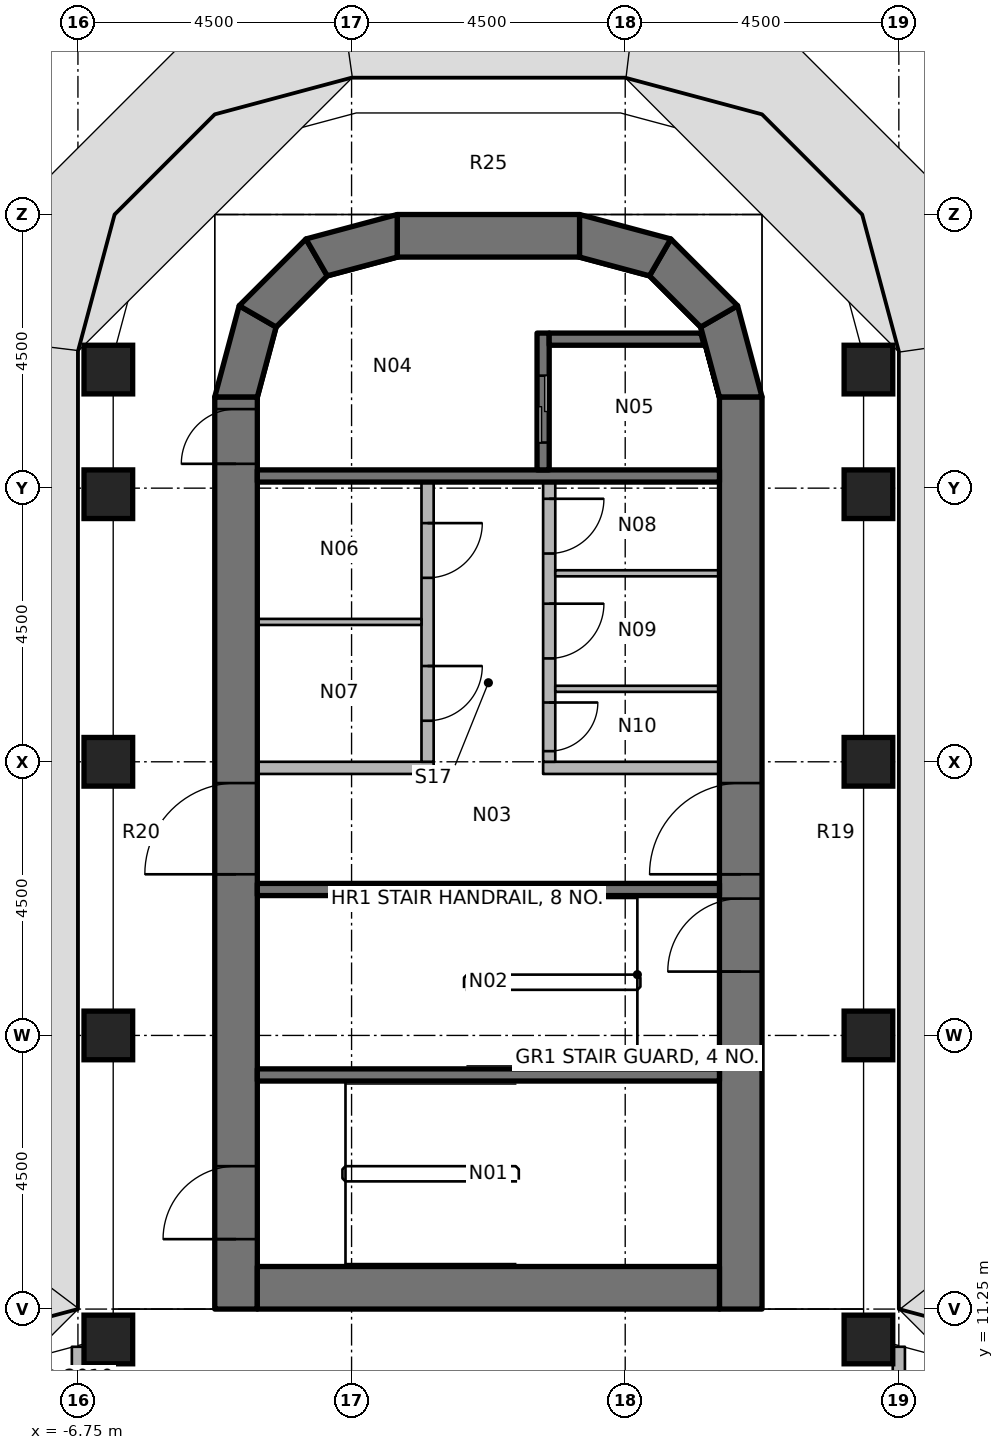
"""IFC4 building model, lengths in metres.
Left out: names, types, materials, properties, quantities, classifications, styles, units other than length and angle.
Written with IfcOpenShell. Run it as: python <this file> out.ifc"""

import sys

from ifc_helpers import new_model, si_unit, direction, frame, frame_2d, origin, origin_2d, place, context, subcontext, project, spatial, polyline, rectangle, outline, extrude, element, fill, save


model = new_model("IFC4")
c1 = context("Model", 3, precision=1e-05, world=origin(), true_north=direction((0.0, 1.0)))
c2 = subcontext(c1, "Body", "Model", "MODEL_VIEW")
j1 = project(units=[si_unit("LENGTHUNIT", "METRE"), si_unit("PLANEANGLEUNIT", "RADIAN")], contexts=[c1])
p1 = place(None, origin())
s1 = spatial("IfcSite", under=j1, at=p1, CompositionType="ELEMENT")
p2 = place(p1, origin())
s2 = spatial("IfcBuilding", under=s1, at=p2, CompositionType="ELEMENT")
p3 = place(p2, frame((0.0, 0.0, 186.6)))
s3 = spatial("IfcBuildingStorey", under=s2, at=p3, CompositionType="ELEMENT", Elevation=186.6)
for number, where, z_axis, x_axis in (
    (1, (-6.25, 10.75, 0.0), (0.0, 0.0, 1.0), (1.0, 0.0, 0.0)),
    (2, (-6.25, 15.75, 0.0), (0.0, 0.0, 1.0), (1.0, 0.0, 0.0)),
    (3, (-6.25, 20.25, 0.0), (0.0, 0.0, 1.0), (1.0, 0.0, 0.0)),
    (4, (-6.25, 24.65, 0.0), (0.0, 0.0, 1.0), (1.0, 0.0, 0.0)),
    (5, (-6.25, 26.7, 0.0), (0.0, 0.0, 1.0), (1.0, 0.0, 0.0)),
    (6, (6.25, 10.75, 0.0), (0.0, 0.0, 1.0), (1.0, 0.0, 0.0)),
    (7, (6.25, 15.75, 0.0), (0.0, 0.0, 1.0), (1.0, 0.0, 0.0)),
    (8, (6.25, 20.25, 0.0), (0.0, 0.0, 1.0), (1.0, 0.0, 0.0)),
    (9, (6.25, 24.65, 0.0), (0.0, 0.0, 1.0), (1.0, 0.0, 0.0)),
    (10, (6.25, 26.7, 0.0), (0.0, 0.0, 1.0), (1.0, 0.0, 0.0)),
):
    element("IfcColumn", number, at=place(p3, frame(where, z_axis=z_axis, x_axis=x_axis)), inside=s3, PredefinedType="COLUMN", context=c2, shape_type="SweptSolid", body=[
        extrude(rectangle(XDim=0.8, YDim=0.8, at=origin_2d()), origin(), (0.0, 0.0, 1.0), 3.65),
    ])
p4 = place(p3, frame((-4.15, 11.25, 0.0), z_axis=(0.0, 0.0, 1.0), x_axis=(0.0, 1.0, 0.0)))
e11 = element("IfcWall", 11, at=p4, inside=s3, PredefinedType="SHEAR", context=c2, shape_type="SweptSolid", body=[
    extrude(rectangle(XDim=15.0, YDim=0.7, at=frame_2d((7.5, 0.0))), origin(), (0.0, 0.0, 1.0), 3.8),
])
p5 = place(p4, frame((7.15, 0.0, 0.0)))
e12 = element("IfcOpeningElement", 12, at=p5, cuts=e11, PredefinedType="OPENING", context=c2, shape_type="SweptSolid", body=[
    extrude(rectangle(XDim=1.5, YDim=2.3, at=frame_2d((0.75, 1.15))), frame((0.0, 0.36, 0.0), z_axis=(0.0, -1.0, 0.0), x_axis=(1.0, 0.0, 0.0)), (0.0, 0.0, 1.0), 0.72),
])
p6 = place(p4, frame((13.9, 0.0, 0.0)))
e13 = element("IfcOpeningElement", 13, at=p6, cuts=e11, PredefinedType="OPENING", context=c2, shape_type="SweptSolid", body=[
    extrude(rectangle(XDim=0.9, YDim=2.1, at=frame_2d((0.45, 1.05))), frame((0.0, 0.36, 0.0), z_axis=(0.0, -1.0, 0.0), x_axis=(1.0, 0.0, 0.0)), (0.0, 0.0, 1.0), 0.72),
])
p7 = place(p4, frame((1.15, 0.0, 0.0)))
e14 = element("IfcOpeningElement", 14, at=p7, cuts=e11, PredefinedType="OPENING", context=c2, shape_type="SweptSolid", body=[
    extrude(rectangle(XDim=1.2, YDim=2.1, at=frame_2d((0.6, 1.05))), frame((0.0, 0.36, 0.0), z_axis=(0.0, -1.0, 0.0), x_axis=(1.0, 0.0, 0.0)), (0.0, 0.0, 1.0), 0.72),
])
p8 = place(p3, frame((4.15, 11.25, 0.0), z_axis=(0.0, 0.0, 1.0), x_axis=(0.0, 1.0, 0.0)))
e15 = element("IfcWall", 15, at=p8, inside=s3, PredefinedType="SHEAR", context=c2, shape_type="SweptSolid", body=[
    extrude(rectangle(XDim=15.0, YDim=0.7, at=frame_2d((7.5, 0.0))), origin(), (0.0, 0.0, 1.0), 3.8),
])
p9 = place(p8, frame((7.15, 0.0, 0.0)))
e16 = element("IfcOpeningElement", 16, at=p9, cuts=e15, PredefinedType="OPENING", context=c2, shape_type="SweptSolid", body=[
    extrude(rectangle(XDim=1.5, YDim=2.3, at=frame_2d((0.75, 1.15))), frame((0.0, 0.36, 0.0), z_axis=(0.0, -1.0, 0.0), x_axis=(1.0, 0.0, 0.0)), (0.0, 0.0, 1.0), 0.72),
])
p10 = place(p8, frame((5.55, 0.0, 0.0)))
e17 = element("IfcOpeningElement", 17, at=p10, cuts=e15, PredefinedType="OPENING", context=c2, shape_type="SweptSolid", body=[
    extrude(rectangle(XDim=1.2, YDim=2.1, at=frame_2d((0.6, 1.05))), frame((0.0, 0.36, 0.0), z_axis=(0.0, -1.0, 0.0), x_axis=(1.0, 0.0, 0.0)), (0.0, 0.0, 1.0), 0.72),
])
p11 = place(p3, frame((-3.8, 11.6, 0.0), z_axis=(0.0, 0.0, 1.0), x_axis=(1.0, 0.0, 0.0)))
e18 = element("IfcWall", 18, at=p11, inside=s3, PredefinedType="SHEAR", context=c2, shape_type="SweptSolid", body=[
    extrude(rectangle(XDim=7.6, YDim=0.7, at=frame_2d((3.8, 0.0))), origin(), (0.0, 0.0, 1.0), 3.8),
])
p12 = place(p3, frame((-1.5, 28.9, 0.0), z_axis=(0.0, 0.0, 1.0), x_axis=(1.0, 0.0, 0.0)))
e19 = element("IfcWall", 19, at=p12, inside=s3, PredefinedType="SHEAR", context=c2, shape_type="SweptSolid", body=[
    extrude(rectangle(XDim=3.0, YDim=0.7, at=frame_2d((1.5, 0.0))), origin(), (0.0, 0.0, 1.0), 3.8),
])
p13 = place(p3, origin())
e20 = element("IfcWall", 20, at=p13, inside=s3, PredefinedType="SHEAR", context=c2, shape_type="SweptSolid", body=[
    extrude(outline(polyline([(-4.5, 26.25), (-4.098, 27.75), (-3.492, 27.4), (-3.8, 26.25), (-4.5, 26.25)])), origin(), (0.0, 0.0, 1.0), 3.8),
])
p14 = place(p3, origin())
e21 = element("IfcWall", 21, at=p14, inside=s3, PredefinedType="SHEAR", context=c2, shape_type="SweptSolid", body=[
    extrude(outline(polyline([(-4.098, 27.75), (-3.0, 28.848), (-2.65, 28.242), (-3.492, 27.4), (-4.098, 27.75)])), origin(), (0.0, 0.0, 1.0), 3.8),
])
p15 = place(p3, origin())
e22 = element("IfcWall", 22, at=p15, inside=s3, PredefinedType="SHEAR", context=c2, shape_type="SweptSolid", body=[
    extrude(outline(polyline([(-3.0, 28.848), (-1.5, 29.25), (-1.5, 28.55), (-2.65, 28.242), (-3.0, 28.848)])), origin(), (0.0, 0.0, 1.0), 3.8),
])
p16 = place(p3, origin())
e23 = element("IfcWall", 23, at=p16, inside=s3, PredefinedType="SHEAR", context=c2, shape_type="SweptSolid", body=[
    extrude(outline(polyline([(4.5, 26.25), (4.098, 27.75), (3.492, 27.4), (3.8, 26.25), (4.5, 26.25)])), origin(), (0.0, 0.0, 1.0), 3.8),
])
p17 = place(p3, origin())
e24 = element("IfcWall", 24, at=p17, inside=s3, PredefinedType="SHEAR", context=c2, shape_type="SweptSolid", body=[
    extrude(outline(polyline([(4.098, 27.75), (3.0, 28.848), (2.65, 28.242), (3.492, 27.4), (4.098, 27.75)])), origin(), (0.0, 0.0, 1.0), 3.8),
])
p18 = place(p3, origin())
e25 = element("IfcWall", 25, at=p18, inside=s3, PredefinedType="SHEAR", context=c2, shape_type="SweptSolid", body=[
    extrude(outline(polyline([(3.0, 28.848), (1.5, 29.25), (1.5, 28.55), (2.65, 28.242), (3.0, 28.848)])), origin(), (0.0, 0.0, 1.0), 3.8),
])
p19 = place(p3, frame((-3.8, 24.95, 0.0), z_axis=(0.0, 0.0, 1.0), x_axis=(1.0, 0.0, 0.0)))
e26 = element("IfcWall", 26, at=p19, inside=s3, PredefinedType="SHEAR", context=c2, shape_type="SweptSolid", body=[
    extrude(rectangle(XDim=7.6, YDim=0.2, at=frame_2d((3.8, 0.0))), origin(), (0.0, 0.0, 1.0), 3.65),
])
p20 = place(p3, frame((0.9, 27.3, 0.0), z_axis=(0.0, 0.0, 1.0), x_axis=(0.0, -1.0, 0.0)))
e27 = element("IfcWall", 27, at=p20, inside=s3, PredefinedType="SHEAR", context=c2, shape_type="SweptSolid", body=[
    extrude(rectangle(XDim=2.25, YDim=0.2, at=frame_2d((1.125, 0.0))), origin(), (0.0, 0.0, 1.0), 3.65),
])
p21 = place(p20, frame((0.7, 0.0, 0.0)))
e28 = element("IfcOpeningElement", 28, at=p21, cuts=e27, PredefinedType="OPENING", context=c2, shape_type="SweptSolid", body=[
    extrude(rectangle(XDim=1.1, YDim=2.3, at=frame_2d((0.55, 1.15))), frame((0.0, 0.11, 0.0), z_axis=(0.0, -1.0, 0.0), x_axis=(1.0, 0.0, 0.0)), (0.0, 0.0, 1.0), 0.22),
])
p22 = place(p3, origin())
e29 = element("IfcWall", 29, at=p22, inside=s3, PredefinedType="SHEAR", context=c2, shape_type="SweptSolid", body=[
    extrude(outline(polyline([(1.0, 27.1), (3.548, 27.1), (3.494, 27.3), (1.0, 27.3), (1.0, 27.1)])), origin(), (0.0, 0.0, 1.0), 3.65),
])
for number, where, z_axis, x_axis in (
    (30, (-3.8, 18.15, 0.0), (0.0, 0.0, 1.0), (1.0, 0.0, 0.0)),
    (31, (-3.8, 15.1, 0.0), (0.0, 0.0, 1.0), (1.0, 0.0, 0.0)),
):
    element("IfcWall", number, at=place(p3, frame(where, z_axis=z_axis, x_axis=x_axis)), inside=s3, PredefinedType="SHEAR", context=c2, shape_type="SweptSolid", body=[
        extrude(rectangle(XDim=7.6, YDim=0.2, at=frame_2d((3.8, 0.0))), origin(), (0.0, 0.0, 1.0), 3.65),
    ])
p23 = place(p3, frame((-3.8, 20.15, 0.0), z_axis=(0.0, 0.0, 1.0), x_axis=(1.0, 0.0, 0.0)))
e32 = element("IfcWall", 32, at=p23, inside=s3, PredefinedType="PARTITIONING", context=c2, shape_type="SweptSolid", body=[
    extrude(rectangle(XDim=2.9, YDim=0.2, at=frame_2d((1.45, 0.0))), origin(), (0.0, 0.0, 1.0), 3.65),
])
p24 = place(p3, frame((-1.0, 24.85, 0.0), z_axis=(0.0, 0.0, 1.0), x_axis=(0.0, -1.0, 0.0)))
e33 = element("IfcWall", 33, at=p24, inside=s3, PredefinedType="PARTITIONING", context=c2, shape_type="SweptSolid", body=[
    extrude(rectangle(XDim=4.6, YDim=0.2, at=frame_2d((2.3, 0.0))), origin(), (0.0, 0.0, 1.0), 3.65),
])
p25 = place(p24, frame((0.675, 0.0, 0.0)))
e34 = element("IfcOpeningElement", 34, at=p25, cuts=e33, PredefinedType="OPENING", context=c2, shape_type="SweptSolid", body=[
    extrude(rectangle(XDim=0.9, YDim=2.1, at=frame_2d((0.45, 1.05))), frame((0.0, 0.11, 0.0), z_axis=(0.0, -1.0, 0.0), x_axis=(1.0, 0.0, 0.0)), (0.0, 0.0, 1.0), 0.22),
])
p26 = place(p24, frame((3.025, 0.0, 0.0)))
e35 = element("IfcOpeningElement", 35, at=p26, cuts=e33, PredefinedType="OPENING", context=c2, shape_type="SweptSolid", body=[
    extrude(rectangle(XDim=0.9, YDim=2.1, at=frame_2d((0.45, 1.05))), frame((0.0, 0.11, 0.0), z_axis=(0.0, -1.0, 0.0), x_axis=(1.0, 0.0, 0.0)), (0.0, 0.0, 1.0), 0.22),
])
p27 = place(p3, frame((0.9, 20.15, 0.0), z_axis=(0.0, 0.0, 1.0), x_axis=(1.0, 0.0, 0.0)))
e36 = element("IfcWall", 36, at=p27, inside=s3, PredefinedType="PARTITIONING", context=c2, shape_type="SweptSolid", body=[
    extrude(rectangle(XDim=2.9, YDim=0.2, at=frame_2d((1.45, 0.0))), origin(), (0.0, 0.0, 1.0), 3.65),
])
p28 = place(p3, frame((1.0, 24.85, 0.0), z_axis=(0.0, 0.0, 1.0), x_axis=(0.0, -1.0, 0.0)))
e37 = element("IfcWall", 37, at=p28, inside=s3, PredefinedType="PARTITIONING", context=c2, shape_type="SweptSolid", body=[
    extrude(rectangle(XDim=4.6, YDim=0.2, at=frame_2d((2.3, 0.0))), origin(), (0.0, 0.0, 1.0), 3.65),
])
p29 = place(p28, frame((0.275, 0.0, 0.0)))
e38 = element("IfcOpeningElement", 38, at=p29, cuts=e37, PredefinedType="OPENING", context=c2, shape_type="SweptSolid", body=[
    extrude(rectangle(XDim=0.9, YDim=2.1, at=frame_2d((0.45, 1.05))), frame((0.0, 0.11, 0.0), z_axis=(0.0, -1.0, 0.0), x_axis=(1.0, 0.0, 0.0)), (0.0, 0.0, 1.0), 0.22),
])
p30 = place(p28, frame((2.0, 0.0, 0.0)))
e39 = element("IfcOpeningElement", 39, at=p30, cuts=e37, PredefinedType="OPENING", context=c2, shape_type="SweptSolid", body=[
    extrude(rectangle(XDim=0.9, YDim=2.1, at=frame_2d((0.45, 1.05))), frame((0.0, 0.11, 0.0), z_axis=(0.0, -1.0, 0.0), x_axis=(1.0, 0.0, 0.0)), (0.0, 0.0, 1.0), 0.22),
])
p31 = place(p28, frame((3.625, 0.0, 0.0)))
e40 = element("IfcOpeningElement", 40, at=p31, cuts=e37, PredefinedType="OPENING", context=c2, shape_type="SweptSolid", body=[
    extrude(rectangle(XDim=0.8, YDim=2.1, at=frame_2d((0.4, 1.05))), frame((0.0, 0.11, 0.0), z_axis=(0.0, -1.0, 0.0), x_axis=(1.0, 0.0, 0.0)), (0.0, 0.0, 1.0), 0.22),
])
for number, where, z_axis, x_axis in (
    (41, (-3.8, 22.55, 0.0), (0.0, 0.0, 1.0), (1.0, 0.0, 0.0)),
    (42, (1.1, 23.35, 0.0), (0.0, 0.0, 1.0), (1.0, 0.0, 0.0)),
    (43, (1.1, 21.45, 0.0), (0.0, 0.0, 1.0), (1.0, 0.0, 0.0)),
):
    element("IfcWall", number, at=place(p3, frame(where, z_axis=z_axis, x_axis=x_axis)), inside=s3, PredefinedType="PARTITIONING", context=c2, shape_type="SweptSolid", body=[
        extrude(rectangle(XDim=2.7, YDim=0.1, at=frame_2d((1.35, 0.0))), origin(), (0.0, 0.0, 1.0), 3.65),
    ])
p32 = place(p3, frame((6.75, 6.85, 0.0), z_axis=(0.0, 0.0, 1.0), x_axis=(0.0, 1.0, 0.0)))
e44 = element("IfcWall", 44, at=p32, inside=s3, PredefinedType="PARTITIONING", context=c2, shape_type="SweptSolid", body=[
    extrude(rectangle(XDim=3.78, YDim=0.2, at=frame_2d((1.89, 0.0))), origin(), (0.0, 0.0, 1.0), 2.746),
])
p33 = place(p3, frame((-6.75, 6.85, 0.0), z_axis=(0.0, 0.0, 1.0), x_axis=(0.0, 1.0, 0.0)))
e45 = element("IfcWall", 45, at=p33, inside=s3, PredefinedType="PARTITIONING", context=c2, shape_type="SweptSolid", body=[
    extrude(rectangle(XDim=3.78, YDim=0.2, at=frame_2d((1.89, 0.0))), origin(), (0.0, 0.0, 1.0), 2.746),
])
p34 = place(p33, frame((1.44, 0.0, 0.0)))
e46 = element("IfcOpeningElement", 46, at=p34, cuts=e45, PredefinedType="OPENING", context=c2, shape_type="SweptSolid", body=[
    extrude(rectangle(XDim=0.9, YDim=2.1, at=frame_2d((0.45, 1.05))), frame((0.0, 0.11, 0.0), z_axis=(0.0, -1.0, 0.0), x_axis=(1.0, 0.0, 0.0)), (0.0, 0.0, 1.0), 0.22),
])
p35 = place(p5, origin())
e47 = element("IfcDoor", 47, at=p35, inside=s3, OperationType="DOUBLE_DOOR_SINGLE_SWING", PredefinedType="DOOR", context=c2, shape_type="SweptSolid", body=[
    extrude(rectangle(XDim=1.5, YDim=2.3, at=frame_2d((0.75, 1.15))), frame((0.0, 0.025, 0.0), z_axis=(0.0, -1.0, 0.0), x_axis=(1.0, 0.0, 0.0)), (0.0, 0.0, 1.0), 0.05),
])
fill(e12, e47)
p36 = place(p9, origin())
e48 = element("IfcDoor", 48, at=p36, inside=s3, OperationType="DOUBLE_DOOR_SINGLE_SWING", PredefinedType="DOOR", context=c2, shape_type="SweptSolid", body=[
    extrude(rectangle(XDim=1.5, YDim=2.3, at=frame_2d((0.75, 1.15))), frame((0.0, 0.025, 0.0), z_axis=(0.0, -1.0, 0.0), x_axis=(1.0, 0.0, 0.0)), (0.0, 0.0, 1.0), 0.05),
])
fill(e16, e48)
p37 = place(p6, origin())
e49 = element("IfcDoor", 49, at=p37, inside=s3, OperationType="SINGLE_SWING_LEFT", PredefinedType="DOOR", context=c2, shape_type="SweptSolid", body=[
    extrude(rectangle(XDim=0.9, YDim=2.1, at=frame_2d((0.45, 1.05))), frame((0.0, 0.025, 0.0), z_axis=(0.0, -1.0, 0.0), x_axis=(1.0, 0.0, 0.0)), (0.0, 0.0, 1.0), 0.05),
])
fill(e13, e49)
p38 = place(p10, origin())
e50 = element("IfcDoor", 50, at=p38, inside=s3, OperationType="SINGLE_SWING_LEFT", PredefinedType="DOOR", context=c2, shape_type="SweptSolid", body=[
    extrude(rectangle(XDim=1.2, YDim=2.1, at=frame_2d((0.6, 1.05))), frame((0.0, 0.025, 0.0), z_axis=(0.0, -1.0, 0.0), x_axis=(1.0, 0.0, 0.0)), (0.0, 0.0, 1.0), 0.05),
])
fill(e17, e50)
p39 = place(p7, origin())
e51 = element("IfcDoor", 51, at=p39, inside=s3, OperationType="SINGLE_SWING_RIGHT", PredefinedType="DOOR", context=c2, shape_type="SweptSolid", body=[
    extrude(rectangle(XDim=1.2, YDim=2.1, at=frame_2d((0.6, 1.05))), frame((0.0, 0.025, 0.0), z_axis=(0.0, -1.0, 0.0), x_axis=(1.0, 0.0, 0.0)), (0.0, 0.0, 1.0), 0.05),
])
fill(e14, e51)
p40 = place(p21, origin())
e52 = element("IfcDoor", 52, at=p40, inside=s3, OperationType="DOUBLE_DOOR_SLIDING", PredefinedType="DOOR", context=c2, shape_type="SweptSolid", body=[
    extrude(rectangle(XDim=1.1, YDim=2.3, at=frame_2d((0.55, 1.15))), frame((0.0, 0.025, 0.0), z_axis=(0.0, -1.0, 0.0), x_axis=(1.0, 0.0, 0.0)), (0.0, 0.0, 1.0), 0.05),
])
fill(e28, e52)
p41 = place(p25, origin())
e53 = element("IfcDoor", 53, at=p41, inside=s3, OperationType="SINGLE_SWING_LEFT", PredefinedType="DOOR", context=c2, shape_type="SweptSolid", body=[
    extrude(rectangle(XDim=0.9, YDim=2.1, at=frame_2d((0.45, 1.05))), frame((0.0, 0.025, 0.0), z_axis=(0.0, -1.0, 0.0), x_axis=(1.0, 0.0, 0.0)), (0.0, 0.0, 1.0), 0.05),
])
fill(e34, e53)
p42 = place(p26, origin())
e54 = element("IfcDoor", 54, at=p42, inside=s3, OperationType="SINGLE_SWING_LEFT", PredefinedType="DOOR", context=c2, shape_type="SweptSolid", body=[
    extrude(rectangle(XDim=0.9, YDim=2.1, at=frame_2d((0.45, 1.05))), frame((0.0, 0.025, 0.0), z_axis=(0.0, -1.0, 0.0), x_axis=(1.0, 0.0, 0.0)), (0.0, 0.0, 1.0), 0.05),
])
fill(e35, e54)
p43 = place(p29, origin())
e55 = element("IfcDoor", 55, at=p43, inside=s3, OperationType="SINGLE_SWING_RIGHT", PredefinedType="DOOR", context=c2, shape_type="SweptSolid", body=[
    extrude(rectangle(XDim=0.9, YDim=2.1, at=frame_2d((0.45, 1.05))), frame((0.0, 0.025, 0.0), z_axis=(0.0, -1.0, 0.0), x_axis=(1.0, 0.0, 0.0)), (0.0, 0.0, 1.0), 0.05),
])
fill(e38, e55)
p44 = place(p30, origin())
e56 = element("IfcDoor", 56, at=p44, inside=s3, OperationType="SINGLE_SWING_LEFT", PredefinedType="DOOR", context=c2, shape_type="SweptSolid", body=[
    extrude(rectangle(XDim=0.9, YDim=2.1, at=frame_2d((0.45, 1.05))), frame((0.0, 0.025, 0.0), z_axis=(0.0, -1.0, 0.0), x_axis=(1.0, 0.0, 0.0)), (0.0, 0.0, 1.0), 0.05),
])
fill(e39, e56)
p45 = place(p31, origin())
e57 = element("IfcDoor", 57, at=p45, inside=s3, OperationType="SINGLE_SWING_RIGHT", PredefinedType="DOOR", context=c2, shape_type="SweptSolid", body=[
    extrude(rectangle(XDim=0.8, YDim=2.1, at=frame_2d((0.4, 1.05))), frame((0.0, 0.025, 0.0), z_axis=(0.0, -1.0, 0.0), x_axis=(1.0, 0.0, 0.0)), (0.0, 0.0, 1.0), 0.05),
])
fill(e40, e57)
save(model, sys.argv[1])
